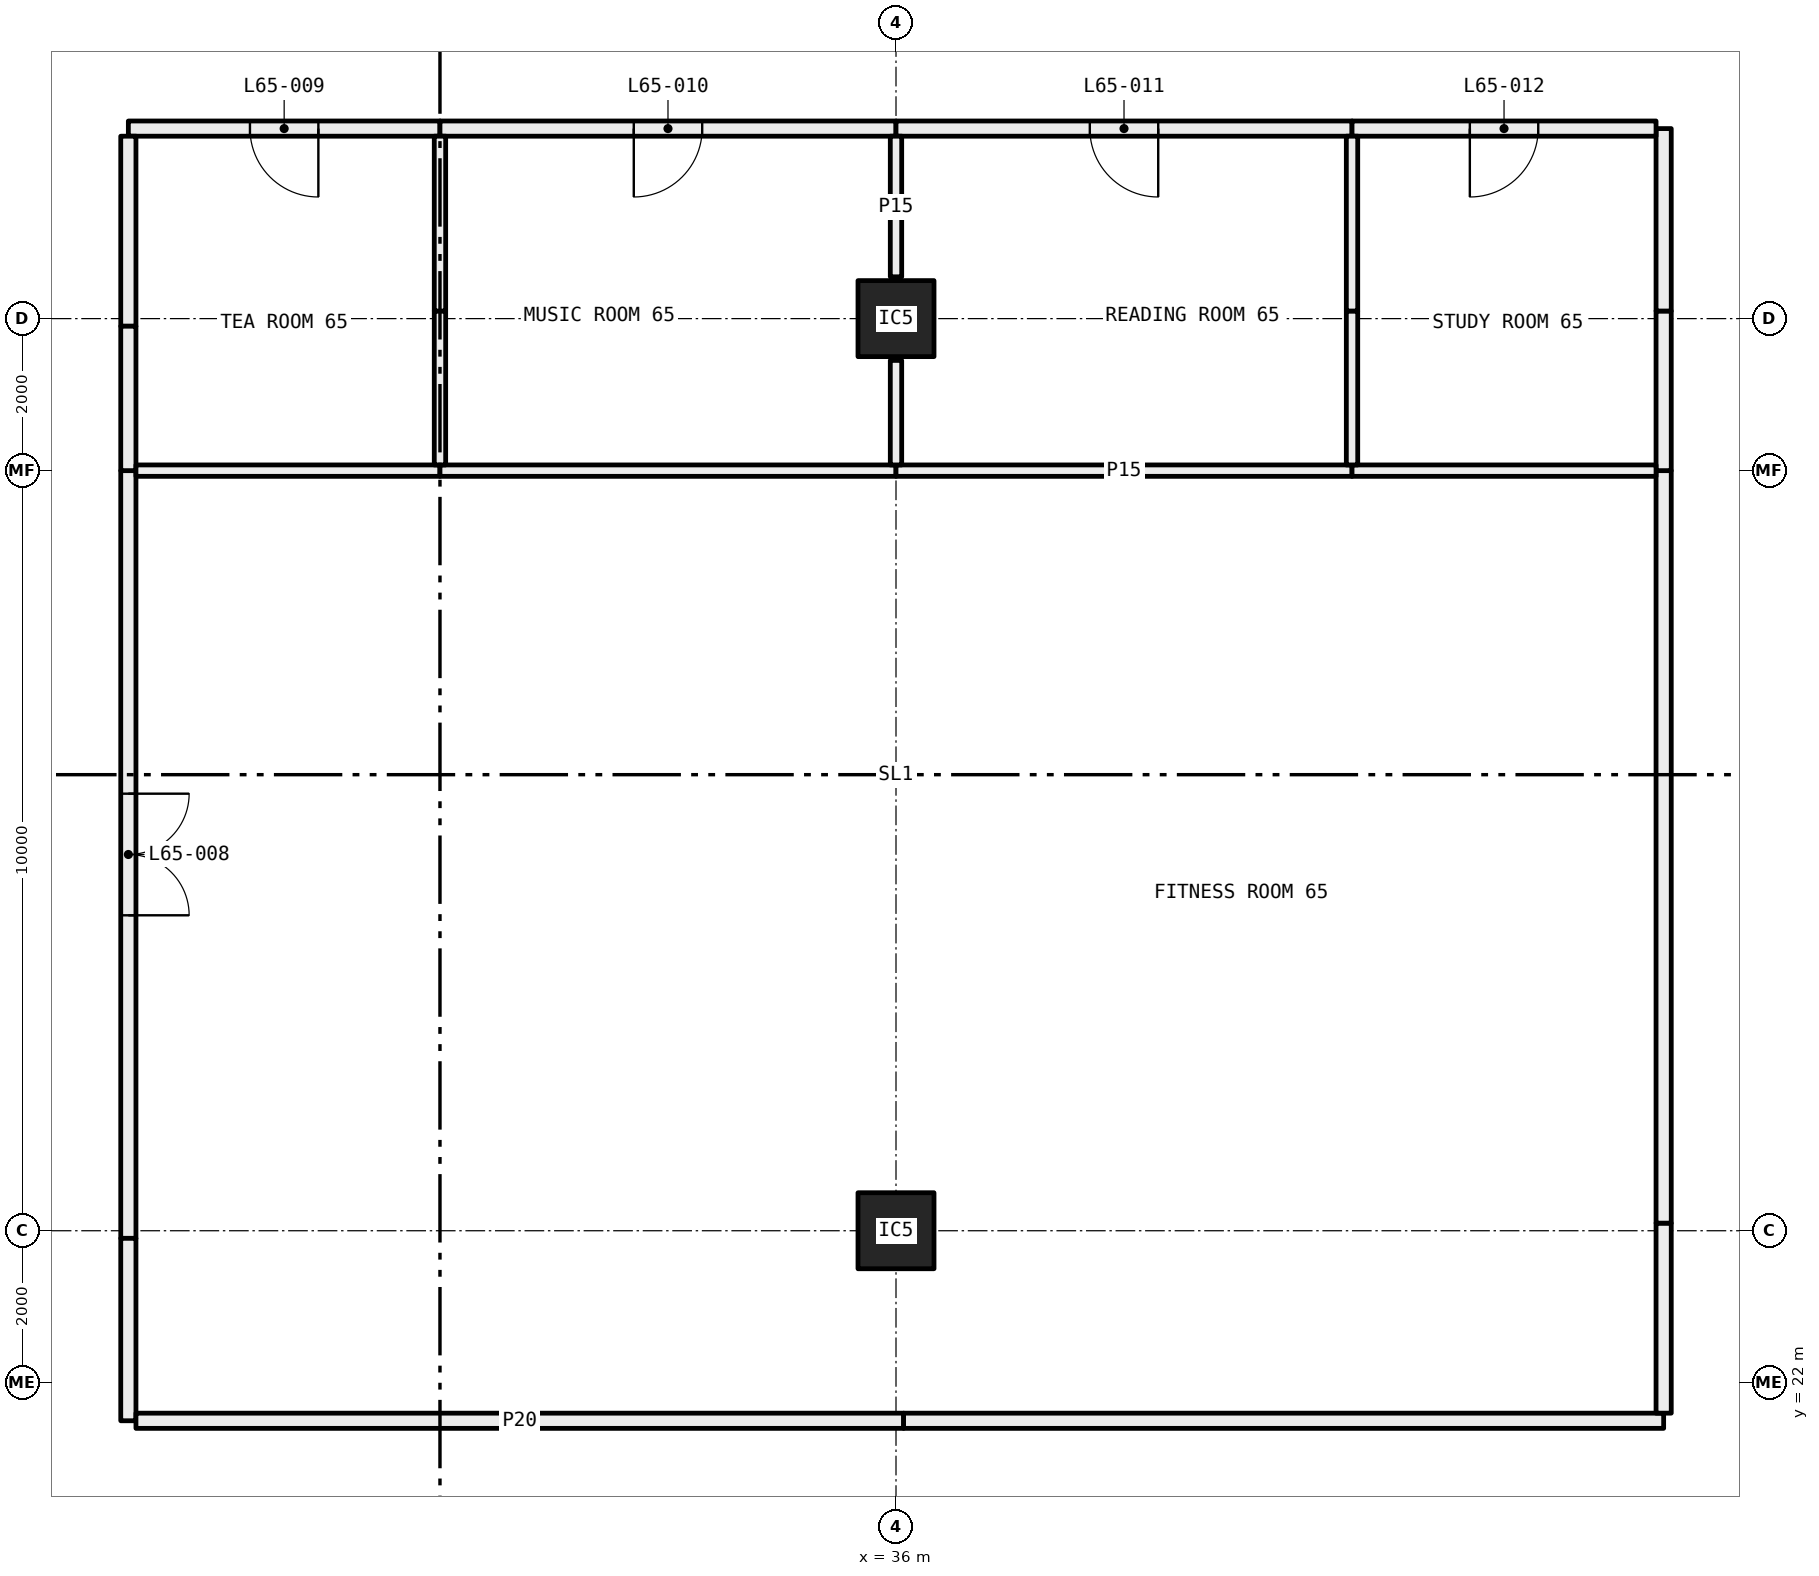
"""IFC4 building model, lengths in metres.
Left out: names, types, materials, properties, quantities, classifications, styles, units other than length and angle.
Written with IfcOpenShell. Run it as: python <this file> out.ifc"""

import sys

from ifc_helpers import new_model, si_unit, direction, frame, frame_2d, origin, origin_2d, place, context, subcontext, project, spatial, rectangle, hollow_rectangle, extrude, element, fill, save


model = new_model("IFC4")
c1 = context("Model", 3, precision=1e-05, world=origin(), true_north=direction((0.0, 1.0)))
c2 = subcontext(c1, "Body", "Model", "MODEL_VIEW")
j1 = project(units=[si_unit("LENGTHUNIT", "METRE"), si_unit("PLANEANGLEUNIT", "RADIAN")], contexts=[c1])
p1 = place(None, origin())
s1 = spatial("IfcSite", under=j1, at=p1, CompositionType="ELEMENT")
p2 = place(p1, origin())
s2 = spatial("IfcBuilding", under=s1, at=p2, CompositionType="ELEMENT")
p3 = place(p2, frame((0.0, 0.0, 242.1)))
s3 = spatial("IfcBuildingStorey", under=s2, at=p3, CompositionType="ELEMENT", Elevation=242.1)
for number, where, z_axis, x_axis in (
    (1, (36.0, 24.0, 0.0), (0.0, 0.0, 1.0), (1.0, 0.0, 0.0)),
    (2, (36.0, 36.0, 0.0), (0.0, 0.0, 1.0), (1.0, 0.0, 0.0)),
):
    element("IfcColumn", number, at=place(p3, frame(where, z_axis=z_axis, x_axis=x_axis)), inside=s3, PredefinedType="COLUMN", context=c2, shape_type="SweptSolid", body=[
        extrude(hollow_rectangle(XDim=1.0, YDim=1.0, WallThickness=0.04, at=origin_2d()), origin(), (0.0, 0.0, 1.0), 3.05),
    ])
p4 = place(p3, frame((25.9, 34.0, 0.0), z_axis=(0.0, 0.0, 1.0), x_axis=(0.0, -1.0, 0.0)))
e3 = element("IfcWall", 3, at=p4, inside=s3, PredefinedType="PARTITIONING", context=c2, shape_type="SweptSolid", body=[
    extrude(rectangle(XDim=10.1, YDim=0.2, at=frame_2d((5.05, 0.0))), origin(), (0.0, 0.0, 1.0), 2.45),
])
p5 = place(p4, frame((4.25, 0.0, 0.0)))
e4 = element("IfcOpeningElement", 4, at=p5, cuts=e3, PredefinedType="OPENING", context=c2, shape_type="SweptSolid", body=[
    extrude(rectangle(XDim=1.6, YDim=2.1, at=frame_2d((0.8, 1.05))), frame((0.0, 0.11, 0.0), z_axis=(0.0, -1.0, 0.0), x_axis=(1.0, 0.0, 0.0)), (0.0, 0.0, 1.0), 0.22),
])
p6 = place(p3, frame((25.9, 23.9, 0.0), z_axis=(0.0, 0.0, 1.0), x_axis=(0.0, -1.0, 0.0)))
e5 = element("IfcWall", 5, at=p6, inside=s3, PredefinedType="PARTITIONING", context=c2, shape_type="SweptSolid", body=[
    extrude(rectangle(XDim=2.4, YDim=0.2, at=frame_2d((1.2, 0.0))), origin(), (0.0, 0.0, 1.0), 3.05),
])
p7 = place(p3, frame((26.0, 21.5, 0.0), z_axis=(0.0, 0.0, 1.0), x_axis=(1.0, 0.0, 0.0)))
e6 = element("IfcWall", 6, at=p7, inside=s3, PredefinedType="PARTITIONING", context=c2, shape_type="SweptSolid", body=[
    extrude(rectangle(XDim=10.1, YDim=0.2, at=frame_2d((5.05, 0.0))), origin(), (0.0, 0.0, 1.0), 2.45),
])
p8 = place(p3, frame((36.1, 21.5, 0.0), z_axis=(0.0, 0.0, 1.0), x_axis=(1.0, 0.0, 0.0)))
e7 = element("IfcWall", 7, at=p8, inside=s3, PredefinedType="PARTITIONING", context=c2, shape_type="SweptSolid", body=[
    extrude(rectangle(XDim=10.0, YDim=0.2, at=frame_2d((5.0, 0.0))), origin(), (0.0, 0.0, 1.0), 3.05),
])
p9 = place(p3, frame((46.1, 21.6, 0.0), z_axis=(0.0, 0.0, 1.0), x_axis=(0.0, 1.0, 0.0)))
e8 = element("IfcWall", 8, at=p9, inside=s3, PredefinedType="PARTITIONING", context=c2, shape_type="SweptSolid", body=[
    extrude(rectangle(XDim=2.5, YDim=0.2, at=frame_2d((1.25, 0.0))), origin(), (0.0, 0.0, 1.0), 2.45),
])
p10 = place(p3, frame((46.1, 24.1, 0.0), z_axis=(0.0, 0.0, 1.0), x_axis=(0.0, 1.0, 0.0)))
e9 = element("IfcWall", 9, at=p10, inside=s3, PredefinedType="PARTITIONING", context=c2, shape_type="SweptSolid", body=[
    extrude(rectangle(XDim=9.9, YDim=0.2, at=frame_2d((4.95, 0.0))), origin(), (0.0, 0.0, 1.0), 3.05),
])
p11 = place(p3, frame((30.0, 38.5, 0.0), z_axis=(0.0, 0.0, 1.0), x_axis=(-1.0, 0.0, 0.0)))
e10 = element("IfcWall", 10, at=p11, inside=s3, PredefinedType="PARTITIONING", context=c2, shape_type="SweptSolid", body=[
    extrude(rectangle(XDim=4.1, YDim=0.2, at=frame_2d((2.05, 0.0))), origin(), (0.0, 0.0, 1.0), 3.05),
])
p12 = place(p11, frame((1.6, 0.0, 0.0)))
e11 = element("IfcOpeningElement", 11, at=p12, cuts=e10, PredefinedType="OPENING", context=c2, shape_type="SweptSolid", body=[
    extrude(rectangle(XDim=0.9, YDim=2.1, at=frame_2d((0.45, 1.05))), frame((0.0, 0.11, 0.0), z_axis=(0.0, -1.0, 0.0), x_axis=(1.0, 0.0, 0.0)), (0.0, 0.0, 1.0), 0.22),
])
p13 = place(p3, frame((25.9, 38.4, 0.0), z_axis=(0.0, 0.0, 1.0), x_axis=(0.0, -1.0, 0.0)))
e12 = element("IfcWall", 12, at=p13, inside=s3, PredefinedType="PARTITIONING", context=c2, shape_type="SweptSolid", body=[
    extrude(rectangle(XDim=2.5, YDim=0.2, at=frame_2d((1.25, 0.0))), origin(), (0.0, 0.0, 1.0), 2.45),
])
p14 = place(p3, frame((25.9, 35.9, 0.0), z_axis=(0.0, 0.0, 1.0), x_axis=(0.0, -1.0, 0.0)))
e13 = element("IfcWall", 13, at=p14, inside=s3, PredefinedType="PARTITIONING", context=c2, shape_type="SweptSolid", body=[
    extrude(rectangle(XDim=1.9, YDim=0.2, at=frame_2d((0.95, 0.0))), origin(), (0.0, 0.0, 1.0), 3.05),
])
p15 = place(p3, frame((36.0, 38.5, 0.0), z_axis=(0.0, 0.0, 1.0), x_axis=(-1.0, 0.0, 0.0)))
e14 = element("IfcWall", 14, at=p15, inside=s3, PredefinedType="PARTITIONING", context=c2, shape_type="SweptSolid", body=[
    extrude(rectangle(XDim=6.0, YDim=0.2, at=frame_2d((3.0, 0.0))), origin(), (0.0, 0.0, 1.0), 2.45),
])
p16 = place(p15, frame((2.55, 0.0, 0.0)))
e15 = element("IfcOpeningElement", 15, at=p16, cuts=e14, PredefinedType="OPENING", context=c2, shape_type="SweptSolid", body=[
    extrude(rectangle(XDim=0.9, YDim=2.1, at=frame_2d((0.45, 1.05))), frame((0.0, 0.11, 0.0), z_axis=(0.0, -1.0, 0.0), x_axis=(1.0, 0.0, 0.0)), (0.0, 0.0, 1.0), 0.22),
])
p17 = place(p3, frame((42.0, 38.5, 0.0), z_axis=(0.0, 0.0, 1.0), x_axis=(-1.0, 0.0, 0.0)))
e16 = element("IfcWall", 16, at=p17, inside=s3, PredefinedType="PARTITIONING", context=c2, shape_type="SweptSolid", body=[
    extrude(rectangle(XDim=6.0, YDim=0.2, at=frame_2d((3.0, 0.0))), origin(), (0.0, 0.0, 1.0), 2.45),
])
p18 = place(p17, frame((2.55, 0.0, 0.0)))
e17 = element("IfcOpeningElement", 17, at=p18, cuts=e16, PredefinedType="OPENING", context=c2, shape_type="SweptSolid", body=[
    extrude(rectangle(XDim=0.9, YDim=2.1, at=frame_2d((0.45, 1.05))), frame((0.0, 0.11, 0.0), z_axis=(0.0, -1.0, 0.0), x_axis=(1.0, 0.0, 0.0)), (0.0, 0.0, 1.0), 0.22),
])
p19 = place(p3, frame((46.1, 34.0, 0.0), z_axis=(0.0, 0.0, 1.0), x_axis=(0.0, 1.0, 0.0)))
e18 = element("IfcWall", 18, at=p19, inside=s3, PredefinedType="PARTITIONING", context=c2, shape_type="SweptSolid", body=[
    extrude(rectangle(XDim=2.1, YDim=0.2, at=frame_2d((1.05, 0.0))), origin(), (0.0, 0.0, 1.0), 2.45),
])
p20 = place(p3, frame((46.1, 36.1, 0.0), z_axis=(0.0, 0.0, 1.0), x_axis=(0.0, 1.0, 0.0)))
e19 = element("IfcWall", 19, at=p20, inside=s3, PredefinedType="PARTITIONING", context=c2, shape_type="SweptSolid", body=[
    extrude(rectangle(XDim=2.4, YDim=0.2, at=frame_2d((1.2, 0.0))), origin(), (0.0, 0.0, 1.0), 3.05),
])
p21 = place(p3, frame((46.0, 38.5, 0.0), z_axis=(0.0, 0.0, 1.0), x_axis=(-1.0, 0.0, 0.0)))
e20 = element("IfcWall", 20, at=p21, inside=s3, PredefinedType="PARTITIONING", context=c2, shape_type="SweptSolid", body=[
    extrude(rectangle(XDim=4.0, YDim=0.2, at=frame_2d((2.0, 0.0))), origin(), (0.0, 0.0, 1.0), 3.05),
])
p22 = place(p21, frame((1.55, 0.0, 0.0)))
e21 = element("IfcOpeningElement", 21, at=p22, cuts=e20, PredefinedType="OPENING", context=c2, shape_type="SweptSolid", body=[
    extrude(rectangle(XDim=0.9, YDim=2.1, at=frame_2d((0.45, 1.05))), frame((0.0, 0.11, 0.0), z_axis=(0.0, -1.0, 0.0), x_axis=(1.0, 0.0, 0.0)), (0.0, 0.0, 1.0), 0.22),
])
p23 = place(p3, frame((30.0, 34.0, 0.0), z_axis=(0.0, 0.0, 1.0), x_axis=(-1.0, 0.0, 0.0)))
e22 = element("IfcWall", 22, at=p23, inside=s3, PredefinedType="PARTITIONING", context=c2, shape_type="SweptSolid", body=[
    extrude(rectangle(XDim=4.0, YDim=0.15, at=frame_2d((2.0, 0.0))), origin(), (0.0, 0.0, 1.0), 3.05),
])
for number, where, z_axis, x_axis in (
    (23, (36.0, 34.0, 0.0), (0.0, 0.0, 1.0), (-1.0, 0.0, 0.0)),
    (24, (42.0, 34.0, 0.0), (0.0, 0.0, 1.0), (-1.0, 0.0, 0.0)),
):
    element("IfcWall", number, at=place(p3, frame(where, z_axis=z_axis, x_axis=x_axis)), inside=s3, PredefinedType="PARTITIONING", context=c2, shape_type="SweptSolid", body=[
        extrude(rectangle(XDim=6.0, YDim=0.15, at=frame_2d((3.0, 0.0))), origin(), (0.0, 0.0, 1.0), 2.45),
    ])
p24 = place(p3, frame((46.0, 34.0, 0.0), z_axis=(0.0, 0.0, 1.0), x_axis=(-1.0, 0.0, 0.0)))
e25 = element("IfcWall", 25, at=p24, inside=s3, PredefinedType="PARTITIONING", context=c2, shape_type="SweptSolid", body=[
    extrude(rectangle(XDim=4.0, YDim=0.15, at=frame_2d((2.0, 0.0))), origin(), (0.0, 0.0, 1.0), 3.05),
])
p25 = place(p3, frame((30.0, 34.075, 0.0), z_axis=(0.0, 0.0, 1.0), x_axis=(0.0, 1.0, 0.0)))
e26 = element("IfcWall", 26, at=p25, inside=s3, PredefinedType="PARTITIONING", context=c2, shape_type="SweptSolid", body=[
    extrude(rectangle(XDim=2.025, YDim=0.15, at=frame_2d((1.013, 0.0))), origin(), (0.0, 0.0, 1.0), 2.45),
])
p26 = place(p3, frame((30.0, 36.1, 0.0), z_axis=(0.0, 0.0, 1.0), x_axis=(0.0, 1.0, 0.0)))
e27 = element("IfcWall", 27, at=p26, inside=s3, PredefinedType="PARTITIONING", context=c2, shape_type="SweptSolid", body=[
    extrude(rectangle(XDim=2.3, YDim=0.15, at=frame_2d((1.15, 0.0))), origin(), (0.0, 0.0, 1.0), 3.05),
])
p27 = place(p3, frame((36.0, 34.075, 0.0), z_axis=(0.0, 0.0, 1.0), x_axis=(0.0, 1.0, 0.0)))
e28 = element("IfcWall", 28, at=p27, inside=s3, PredefinedType="PARTITIONING", context=c2, shape_type="SweptSolid", body=[
    extrude(rectangle(XDim=1.375, YDim=0.15, at=frame_2d((0.688, 0.0))), origin(), (0.0, 0.0, 1.0), 2.45),
])
p28 = place(p3, frame((36.0, 36.55, 0.0), z_axis=(0.0, 0.0, 1.0), x_axis=(0.0, 1.0, 0.0)))
e29 = element("IfcWall", 29, at=p28, inside=s3, PredefinedType="PARTITIONING", context=c2, shape_type="SweptSolid", body=[
    extrude(rectangle(XDim=1.85, YDim=0.15, at=frame_2d((0.925, 0.0))), origin(), (0.0, 0.0, 1.0), 2.45),
])
p29 = place(p3, frame((42.0, 34.075, 0.0), z_axis=(0.0, 0.0, 1.0), x_axis=(0.0, 1.0, 0.0)))
e30 = element("IfcWall", 30, at=p29, inside=s3, PredefinedType="PARTITIONING", context=c2, shape_type="SweptSolid", body=[
    extrude(rectangle(XDim=2.025, YDim=0.15, at=frame_2d((1.013, 0.0))), origin(), (0.0, 0.0, 1.0), 2.45),
])
p30 = place(p3, frame((42.0, 36.1, 0.0), z_axis=(0.0, 0.0, 1.0), x_axis=(0.0, 1.0, 0.0)))
e31 = element("IfcWall", 31, at=p30, inside=s3, PredefinedType="PARTITIONING", context=c2, shape_type="SweptSolid", body=[
    extrude(rectangle(XDim=2.3, YDim=0.15, at=frame_2d((1.15, 0.0))), origin(), (0.0, 0.0, 1.0), 3.05),
])
p31 = place(p5, origin())
e32 = element("IfcDoor", 32, at=p31, inside=s3, OperationType="DOUBLE_DOOR_SINGLE_SWING", PredefinedType="DOOR", context=c2, shape_type="SweptSolid", body=[
    extrude(rectangle(XDim=1.6, YDim=2.1, at=frame_2d((0.8, 1.05))), frame((0.0, 0.025, 0.0), z_axis=(0.0, -1.0, 0.0), x_axis=(1.0, 0.0, 0.0)), (0.0, 0.0, 1.0), 0.05),
])
fill(e4, e32)
p32 = place(p12, origin())
e33 = element("IfcDoor", 33, at=p32, inside=s3, OperationType="SINGLE_SWING_RIGHT", PredefinedType="DOOR", context=c2, shape_type="SweptSolid", body=[
    extrude(rectangle(XDim=0.9, YDim=2.1, at=frame_2d((0.45, 1.05))), frame((0.0, 0.025, 0.0), z_axis=(0.0, -1.0, 0.0), x_axis=(1.0, 0.0, 0.0)), (0.0, 0.0, 1.0), 0.05),
])
fill(e11, e33)
p33 = place(p16, origin())
e34 = element("IfcDoor", 34, at=p33, inside=s3, OperationType="SINGLE_SWING_LEFT", PredefinedType="DOOR", context=c2, shape_type="SweptSolid", body=[
    extrude(rectangle(XDim=0.9, YDim=2.1, at=frame_2d((0.45, 1.05))), frame((0.0, 0.025, 0.0), z_axis=(0.0, -1.0, 0.0), x_axis=(1.0, 0.0, 0.0)), (0.0, 0.0, 1.0), 0.05),
])
fill(e15, e34)
p34 = place(p18, origin())
e35 = element("IfcDoor", 35, at=p34, inside=s3, OperationType="SINGLE_SWING_RIGHT", PredefinedType="DOOR", context=c2, shape_type="SweptSolid", body=[
    extrude(rectangle(XDim=0.9, YDim=2.1, at=frame_2d((0.45, 1.05))), frame((0.0, 0.025, 0.0), z_axis=(0.0, -1.0, 0.0), x_axis=(1.0, 0.0, 0.0)), (0.0, 0.0, 1.0), 0.05),
])
fill(e17, e35)
p35 = place(p22, origin())
e36 = element("IfcDoor", 36, at=p35, inside=s3, OperationType="SINGLE_SWING_LEFT", PredefinedType="DOOR", context=c2, shape_type="SweptSolid", body=[
    extrude(rectangle(XDim=0.9, YDim=2.1, at=frame_2d((0.45, 1.05))), frame((0.0, 0.025, 0.0), z_axis=(0.0, -1.0, 0.0), x_axis=(1.0, 0.0, 0.0)), (0.0, 0.0, 1.0), 0.05),
])
fill(e21, e36)
save(model, sys.argv[1])
